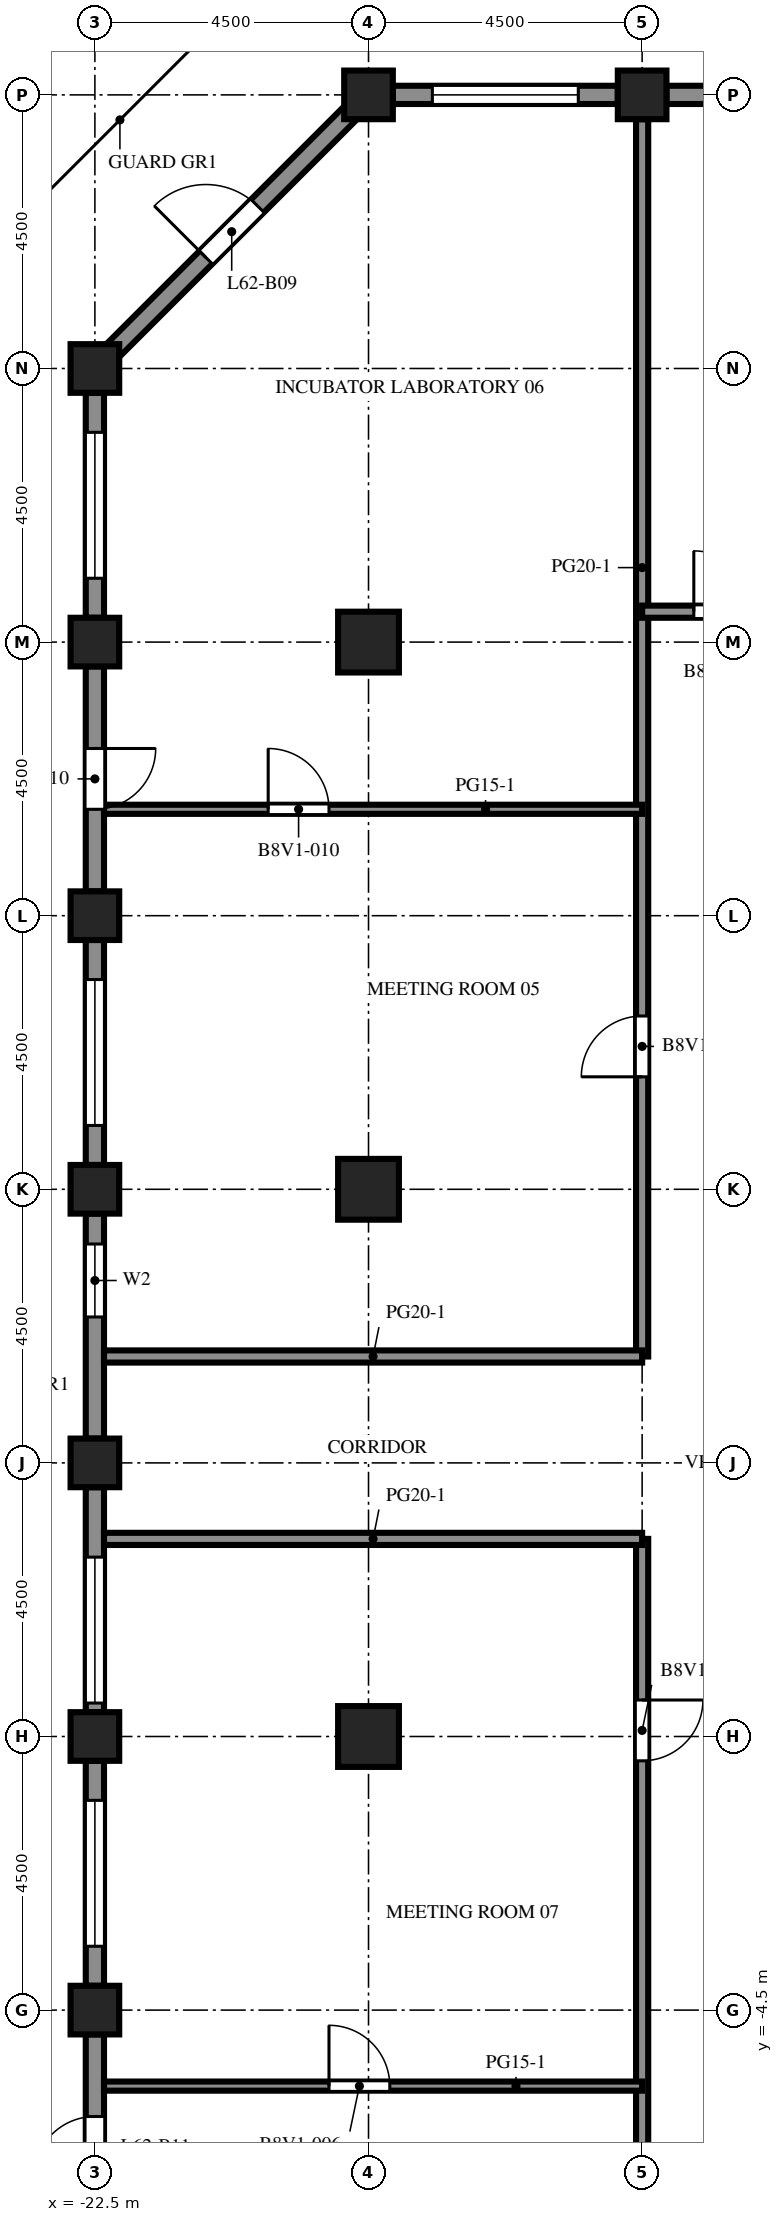
"""IFC4 building model, lengths in metres.
Left out: names, types, materials, properties, quantities, classifications, styles, units other than length and angle.
Written with IfcOpenShell. Run it as: python <this file> out.ifc"""

import sys

from ifc_helpers import new_model, si_unit, direction, frame, frame_2d, origin, origin_2d, place, context, subcontext, project, spatial, rectangle, extrude, element, fill, save


model = new_model("IFC4")
c1 = context("Model", 3, precision=1e-05, world=origin(), true_north=direction((0.0, 1.0)))
c2 = subcontext(c1, "Body", "Model", "MODEL_VIEW")
j1 = project(units=[si_unit("LENGTHUNIT", "METRE"), si_unit("PLANEANGLEUNIT", "RADIAN")], contexts=[c1])
p1 = place(None, origin())
s1 = spatial("IfcSite", under=j1, at=p1, CompositionType="ELEMENT")
p2 = place(p1, origin())
s2 = spatial("IfcBuilding", under=s1, at=p2, CompositionType="ELEMENT")
p3 = place(p2, frame((0.0, 0.0, 274.5)))
s3 = spatial("IfcBuildingStorey", under=s2, at=p3, CompositionType="ELEMENT", Elevation=274.5)
for number, where, z_axis, x_axis in (
    (1, (-22.5, -4.5, 0.0), (0.0, 0.0, 1.0), (1.0, 0.0, 0.0)),
    (2, (-22.5, 0.0, 0.0), (0.0, 0.0, 1.0), (1.0, 0.0, 0.0)),
    (3, (-22.5, 4.5, 0.0), (0.0, 0.0, 1.0), (1.0, 0.0, 0.0)),
    (4, (-22.5, 9.0, 0.0), (0.0, 0.0, 1.0), (1.0, 0.0, 0.0)),
    (5, (-22.5, 13.5, 0.0), (0.0, 0.0, 1.0), (1.0, 0.0, 0.0)),
    (6, (-22.5, 18.0, 0.0), (0.0, 0.0, 1.0), (1.0, 0.0, 0.0)),
    (7, (-22.5, 22.5, 0.0), (0.0, 0.0, 1.0), (1.0, 0.0, 0.0)),
    (8, (-18.0, 27.0, 0.0), (0.0, 0.0, 1.0), (1.0, 0.0, 0.0)),
    (9, (-13.5, 27.0, 0.0), (0.0, 0.0, 1.0), (1.0, 0.0, 0.0)),
):
    element("IfcColumn", number, at=place(p3, frame(where, z_axis=z_axis, x_axis=x_axis)), inside=s3, PredefinedType="COLUMN", context=c2, shape_type="SweptSolid", body=[
        extrude(rectangle(XDim=0.8, YDim=0.8, at=origin_2d()), origin(), (0.0, 0.0, 1.0), 4.1),
    ])
for number, where, z_axis, x_axis in (
    (10, (-18.0, 0.0, 0.0), (0.0, 0.0, 1.0), (1.0, 0.0, 0.0)),
    (11, (-18.0, 9.0, 0.0), (0.0, 0.0, 1.0), (1.0, 0.0, 0.0)),
    (12, (-18.0, 18.0, 0.0), (0.0, 0.0, 1.0), (1.0, 0.0, 0.0)),
):
    element("IfcColumn", number, at=place(p3, frame(where, z_axis=z_axis, x_axis=x_axis)), inside=s3, PredefinedType="COLUMN", context=c2, shape_type="SweptSolid", body=[
        extrude(rectangle(XDim=1.0, YDim=1.0, at=origin_2d()), origin(), (0.0, 0.0, 1.0), 4.1),
    ])
p4 = place(p3, frame((-13.1, 27.0, 0.0), z_axis=(0.0, 0.0, 1.0), x_axis=(1.0, 0.0, 0.0)))
e13 = element("IfcWall", 13, at=p4, inside=s3, PredefinedType="SOLIDWALL", context=c2, shape_type="SweptSolid", body=[
    extrude(rectangle(XDim=3.7, YDim=0.3, at=frame_2d((1.85, 0.0))), origin(), (0.0, 0.0, 1.0), 2.85),
])
p5 = place(p4, frame((1.35, 0.0, 0.0)))
e14 = element("IfcOpeningElement", 14, at=p5, cuts=e13, PredefinedType="OPENING", context=c2, shape_type="SweptSolid", body=[
    extrude(rectangle(XDim=1.0, YDim=2.2, at=frame_2d((0.5, 1.1))), frame((0.0, 0.16, 0.0), z_axis=(0.0, -1.0, 0.0), x_axis=(1.0, 0.0, 0.0)), (0.0, 0.0, 1.0), 0.32),
])
p6 = place(p3, frame((-17.6, 27.0, 0.0), z_axis=(0.0, 0.0, 1.0), x_axis=(1.0, 0.0, 0.0)))
e15 = element("IfcWall", 15, at=p6, inside=s3, PredefinedType="SOLIDWALL", context=c2, shape_type="SweptSolid", body=[
    extrude(rectangle(XDim=3.7, YDim=0.3, at=frame_2d((1.85, 0.0))), origin(), (0.0, 0.0, 1.0), 2.85),
])
p7 = place(p6, frame((0.65, 0.0, 0.8)))
e16 = element("IfcOpeningElement", 16, at=p7, cuts=e15, PredefinedType="OPENING", context=c2, shape_type="SweptSolid", body=[
    extrude(rectangle(XDim=2.4, YDim=1.7, at=frame_2d((1.2, 0.85))), frame((0.0, 0.16, 0.0), z_axis=(0.0, -1.0, 0.0), x_axis=(1.0, 0.0, 0.0)), (0.0, 0.0, 1.0), 0.32),
])
p8 = place(p3, frame((-22.206, 22.794, 0.0), z_axis=(0.0, 0.0, 1.0), x_axis=(0.707106781187, 0.707106781187, 0.0)))
e17 = element("IfcWall", 17, at=p8, inside=s3, PredefinedType="SOLIDWALL", context=c2, shape_type="SweptSolid", body=[
    extrude(rectangle(XDim=5.532, YDim=0.3, at=frame_2d((2.766, 0.0))), origin(), (0.0, 0.0, 1.0), 2.85),
])
p9 = place(p8, frame((2.166, 0.0, 0.0)))
e18 = element("IfcOpeningElement", 18, at=p9, cuts=e17, PredefinedType="OPENING", context=c2, shape_type="SweptSolid", body=[
    extrude(rectangle(XDim=1.2, YDim=2.2, at=frame_2d((0.6, 1.1))), frame((0.0, 0.16, 0.0), z_axis=(0.0, -1.0, 0.0), x_axis=(1.0, 0.0, 0.0)), (0.0, 0.0, 1.0), 0.32),
])
p10 = place(p3, frame((-22.5, 18.4, 0.0), z_axis=(0.0, 0.0, 1.0), x_axis=(0.0, 1.0, 0.0)))
e19 = element("IfcWall", 19, at=p10, inside=s3, PredefinedType="SOLIDWALL", context=c2, shape_type="SweptSolid", body=[
    extrude(rectangle(XDim=3.7, YDim=0.3, at=frame_2d((1.85, 0.0))), origin(), (0.0, 0.0, 1.0), 2.85),
])
p11 = place(p10, frame((0.65, 0.0, 0.8)))
e20 = element("IfcOpeningElement", 20, at=p11, cuts=e19, PredefinedType="OPENING", context=c2, shape_type="SweptSolid", body=[
    extrude(rectangle(XDim=2.4, YDim=1.7, at=frame_2d((1.2, 0.85))), frame((0.0, 0.16, 0.0), z_axis=(0.0, -1.0, 0.0), x_axis=(1.0, 0.0, 0.0)), (0.0, 0.0, 1.0), 0.32),
])
p12 = place(p3, frame((-22.5, 13.9, 0.0), z_axis=(0.0, 0.0, 1.0), x_axis=(0.0, 1.0, 0.0)))
e21 = element("IfcWall", 21, at=p12, inside=s3, PredefinedType="SOLIDWALL", context=c2, shape_type="SweptSolid", body=[
    extrude(rectangle(XDim=3.7, YDim=0.3, at=frame_2d((1.85, 0.0))), origin(), (0.0, 0.0, 1.0), 2.85),
])
p13 = place(p12, frame((1.35, 0.0, 0.0)))
e22 = element("IfcOpeningElement", 22, at=p13, cuts=e21, PredefinedType="OPENING", context=c2, shape_type="SweptSolid", body=[
    extrude(rectangle(XDim=1.0, YDim=2.2, at=frame_2d((0.5, 1.1))), frame((0.0, 0.16, 0.0), z_axis=(0.0, -1.0, 0.0), x_axis=(1.0, 0.0, 0.0)), (0.0, 0.0, 1.0), 0.32),
])
p14 = place(p3, frame((-22.5, 9.4, 0.0), z_axis=(0.0, 0.0, 1.0), x_axis=(0.0, 1.0, 0.0)))
e23 = element("IfcWall", 23, at=p14, inside=s3, PredefinedType="SOLIDWALL", context=c2, shape_type="SweptSolid", body=[
    extrude(rectangle(XDim=3.7, YDim=0.3, at=frame_2d((1.85, 0.0))), origin(), (0.0, 0.0, 1.0), 2.85),
])
p15 = place(p14, frame((0.65, 0.0, 0.8)))
e24 = element("IfcOpeningElement", 24, at=p15, cuts=e23, PredefinedType="OPENING", context=c2, shape_type="SweptSolid", body=[
    extrude(rectangle(XDim=2.4, YDim=1.7, at=frame_2d((1.2, 0.85))), frame((0.0, 0.16, 0.0), z_axis=(0.0, -1.0, 0.0), x_axis=(1.0, 0.0, 0.0)), (0.0, 0.0, 1.0), 0.32),
])
p16 = place(p3, frame((-22.5, 4.9, 0.0), z_axis=(0.0, 0.0, 1.0), x_axis=(0.0, 1.0, 0.0)))
e25 = element("IfcWall", 25, at=p16, inside=s3, PredefinedType="SOLIDWALL", context=c2, shape_type="SweptSolid", body=[
    extrude(rectangle(XDim=3.7, YDim=0.3, at=frame_2d((1.85, 0.0))), origin(), (0.0, 0.0, 1.0), 2.85),
])
p17 = place(p16, frame((2.0, 0.0, 0.8)))
e26 = element("IfcOpeningElement", 26, at=p17, cuts=e25, PredefinedType="OPENING", context=c2, shape_type="SweptSolid", body=[
    extrude(rectangle(XDim=1.2, YDim=1.7, at=frame_2d((0.6, 0.85))), frame((0.0, 0.16, 0.0), z_axis=(0.0, -1.0, 0.0), x_axis=(1.0, 0.0, 0.0)), (0.0, 0.0, 1.0), 0.32),
])
p18 = place(p3, frame((-22.5, 0.4, 0.0), z_axis=(0.0, 0.0, 1.0), x_axis=(0.0, 1.0, 0.0)))
e27 = element("IfcWall", 27, at=p18, inside=s3, PredefinedType="SOLIDWALL", context=c2, shape_type="SweptSolid", body=[
    extrude(rectangle(XDim=3.7, YDim=0.3, at=frame_2d((1.85, 0.0))), origin(), (0.0, 0.0, 1.0), 2.85),
])
p19 = place(p18, frame((0.15, 0.0, 0.8)))
e28 = element("IfcOpeningElement", 28, at=p19, cuts=e27, PredefinedType="OPENING", context=c2, shape_type="SweptSolid", body=[
    extrude(rectangle(XDim=2.4, YDim=1.7, at=frame_2d((1.2, 0.85))), frame((0.0, 0.16, 0.0), z_axis=(0.0, -1.0, 0.0), x_axis=(1.0, 0.0, 0.0)), (0.0, 0.0, 1.0), 0.32),
])
p20 = place(p3, frame((-22.5, -4.1, 0.0), z_axis=(0.0, 0.0, 1.0), x_axis=(0.0, 1.0, 0.0)))
e29 = element("IfcWall", 29, at=p20, inside=s3, PredefinedType="SOLIDWALL", context=c2, shape_type="SweptSolid", body=[
    extrude(rectangle(XDim=3.7, YDim=0.3, at=frame_2d((1.85, 0.0))), origin(), (0.0, 0.0, 1.0), 2.85),
])
p21 = place(p20, frame((0.65, 0.0, 0.8)))
e30 = element("IfcOpeningElement", 30, at=p21, cuts=e29, PredefinedType="OPENING", context=c2, shape_type="SweptSolid", body=[
    extrude(rectangle(XDim=2.4, YDim=1.7, at=frame_2d((1.2, 0.85))), frame((0.0, 0.16, 0.0), z_axis=(0.0, -1.0, 0.0), x_axis=(1.0, 0.0, 0.0)), (0.0, 0.0, 1.0), 0.32),
])
p22 = place(p3, frame((-22.5, -8.6, 0.0), z_axis=(0.0, 0.0, 1.0), x_axis=(0.0, 1.0, 0.0)))
e31 = element("IfcWall", 31, at=p22, inside=s3, PredefinedType="SOLIDWALL", context=c2, shape_type="SweptSolid", body=[
    extrude(rectangle(XDim=3.7, YDim=0.3, at=frame_2d((1.85, 0.0))), origin(), (0.0, 0.0, 1.0), 2.85),
])
p23 = place(p22, frame((1.35, 0.0, 0.0)))
e32 = element("IfcOpeningElement", 32, at=p23, cuts=e31, PredefinedType="OPENING", context=c2, shape_type="SweptSolid", body=[
    extrude(rectangle(XDim=1.0, YDim=2.2, at=frame_2d((0.5, 1.1))), frame((0.0, 0.16, 0.0), z_axis=(0.0, -1.0, 0.0), x_axis=(1.0, 0.0, 0.0)), (0.0, 0.0, 1.0), 0.32),
])
p24 = place(p3, frame((-13.5, -17.6, 0.0), z_axis=(0.0, 0.0, 1.0), x_axis=(0.0, 1.0, 0.0)))
e33 = element("IfcWall", 33, at=p24, inside=s3, PredefinedType="PARTITIONING", context=c2, shape_type="SweptSolid", body=[
    extrude(rectangle(XDim=20.85, YDim=0.2, at=frame_2d((10.425, 0.0))), origin(), (0.0, 0.0, 1.0), 3.65),
])
p25 = place(p24, frame((17.2, 0.0, 0.0)))
e34 = element("IfcOpeningElement", 34, at=p25, cuts=e33, PredefinedType="OPENING", context=c2, shape_type="SweptSolid", body=[
    extrude(rectangle(XDim=1.0, YDim=2.1, at=frame_2d((0.5, 1.05))), frame((0.0, 0.11, 0.0), z_axis=(0.0, -1.0, 0.0), x_axis=(1.0, 0.0, 0.0)), (0.0, 0.0, 1.0), 0.22),
])
p26 = place(p3, frame((-13.5, 6.25, 0.0), z_axis=(0.0, 0.0, 1.0), x_axis=(0.0, 1.0, 0.0)))
e35 = element("IfcWall", 35, at=p26, inside=s3, PredefinedType="PARTITIONING", context=c2, shape_type="SweptSolid", body=[
    extrude(rectangle(XDim=20.35, YDim=0.2, at=frame_2d((10.175, 0.0))), origin(), (0.0, 0.0, 1.0), 3.65),
])
p27 = place(p26, frame((4.6, 0.0, 0.0)))
e36 = element("IfcOpeningElement", 36, at=p27, cuts=e35, PredefinedType="OPENING", context=c2, shape_type="SweptSolid", body=[
    extrude(rectangle(XDim=1.0, YDim=2.1, at=frame_2d((0.5, 1.05))), frame((0.0, 0.11, 0.0), z_axis=(0.0, -1.0, 0.0), x_axis=(1.0, 0.0, 0.0)), (0.0, 0.0, 1.0), 0.22),
])
p28 = place(p3, frame((-13.5, -5.75, 0.0), z_axis=(0.0, 0.0, 1.0), x_axis=(-1.0, 0.0, 0.0)))
e37 = element("IfcWall", 37, at=p28, inside=s3, PredefinedType="PARTITIONING", context=c2, shape_type="SweptSolid", body=[
    extrude(rectangle(XDim=8.85, YDim=0.15, at=frame_2d((4.425, 0.0))), origin(), (0.0, 0.0, 1.0), 3.65),
])
p29 = place(p28, frame((4.15, 0.0, 0.0)))
e38 = element("IfcOpeningElement", 38, at=p29, cuts=e37, PredefinedType="OPENING", context=c2, shape_type="SweptSolid", body=[
    extrude(rectangle(XDim=1.0, YDim=2.1, at=frame_2d((0.5, 1.05))), frame((0.0, 0.085, 0.0), z_axis=(0.0, -1.0, 0.0), x_axis=(1.0, 0.0, 0.0)), (0.0, 0.0, 1.0), 0.17),
])
for number, where, z_axis, x_axis in (
    (39, (-22.35, 3.25, 0.0), (0.0, 0.0, 1.0), (1.0, 0.0, 0.0)),
    (40, (-22.35, 6.25, 0.0), (0.0, 0.0, 1.0), (1.0, 0.0, 0.0)),
):
    element("IfcWall", number, at=place(p3, frame(where, z_axis=z_axis, x_axis=x_axis)), inside=s3, PredefinedType="PARTITIONING", context=c2, shape_type="SweptSolid", body=[
        extrude(rectangle(XDim=8.85, YDim=0.2, at=frame_2d((4.425, 0.0))), origin(), (0.0, 0.0, 1.0), 3.65),
    ])
p30 = place(p3, frame((-22.35, 15.25, 0.0), z_axis=(0.0, 0.0, 1.0), x_axis=(1.0, 0.0, 0.0)))
e41 = element("IfcWall", 41, at=p30, inside=s3, PredefinedType="PARTITIONING", context=c2, shape_type="SweptSolid", body=[
    extrude(rectangle(XDim=8.85, YDim=0.15, at=frame_2d((4.425, 0.0))), origin(), (0.0, 0.0, 1.0), 3.65),
])
p31 = place(p30, frame((2.7, 0.0, 0.0)))
e42 = element("IfcOpeningElement", 42, at=p31, cuts=e41, PredefinedType="OPENING", context=c2, shape_type="SweptSolid", body=[
    extrude(rectangle(XDim=1.0, YDim=2.1, at=frame_2d((0.5, 1.05))), frame((0.0, 0.085, 0.0), z_axis=(0.0, -1.0, 0.0), x_axis=(1.0, 0.0, 0.0)), (0.0, 0.0, 1.0), 0.17),
])
p32 = place(p3, frame((-13.5, 18.5, 0.0), z_axis=(0.0, 0.0, 1.0), x_axis=(1.0, 0.0, 0.0)))
e43 = element("IfcWall", 43, at=p32, inside=s3, PredefinedType="PARTITIONING", context=c2, shape_type="SweptSolid", body=[
    extrude(rectangle(XDim=3.0, YDim=0.2, at=frame_2d((1.5, 0.0))), origin(), (0.0, 0.0, 1.0), 3.65),
])
p33 = place(p32, frame((0.85, 0.0, 0.0)))
e44 = element("IfcOpeningElement", 44, at=p33, cuts=e43, PredefinedType="OPENING", context=c2, shape_type="SweptSolid", body=[
    extrude(rectangle(XDim=1.0, YDim=2.1, at=frame_2d((0.5, 1.05))), frame((0.0, 0.11, 0.0), z_axis=(0.0, -1.0, 0.0), x_axis=(1.0, 0.0, 0.0)), (0.0, 0.0, 1.0), 0.22),
])
p34 = place(p7, origin())
e45 = element("IfcWindow", 45, at=p34, inside=s3, PartitioningType="SINGLE_PANEL", PredefinedType="WINDOW", context=c2, shape_type="SweptSolid", body=[
    extrude(rectangle(XDim=2.4, YDim=1.7, at=frame_2d((1.2, 0.85))), frame((0.0, 0.03, 0.0), z_axis=(0.0, -1.0, 0.0), x_axis=(1.0, 0.0, 0.0)), (0.0, 0.0, 1.0), 0.06),
])
fill(e16, e45)
p35 = place(p9, origin())
e46 = element("IfcDoor", 46, at=p35, inside=s3, OperationType="SINGLE_SWING_LEFT", PredefinedType="DOOR", context=c2, shape_type="SweptSolid", body=[
    extrude(rectangle(XDim=1.2, YDim=2.2, at=frame_2d((0.6, 1.1))), frame((0.0, 0.025, 0.0), z_axis=(0.0, -1.0, 0.0), x_axis=(1.0, 0.0, 0.0)), (0.0, 0.0, 1.0), 0.05),
])
fill(e18, e46)
p36 = place(p11, origin())
e47 = element("IfcWindow", 47, at=p36, inside=s3, PartitioningType="SINGLE_PANEL", PredefinedType="WINDOW", context=c2, shape_type="SweptSolid", body=[
    extrude(rectangle(XDim=2.4, YDim=1.7, at=frame_2d((1.2, 0.85))), frame((0.0, 0.03, 0.0), z_axis=(0.0, -1.0, 0.0), x_axis=(1.0, 0.0, 0.0)), (0.0, 0.0, 1.0), 0.06),
])
fill(e20, e47)
p37 = place(p13, origin())
e48 = element("IfcDoor", 48, at=p37, inside=s3, OperationType="SINGLE_SWING_RIGHT", PredefinedType="DOOR", context=c2, shape_type="SweptSolid", body=[
    extrude(rectangle(XDim=1.0, YDim=2.2, at=frame_2d((0.5, 1.1))), frame((0.0, 0.025, 0.0), z_axis=(0.0, -1.0, 0.0), x_axis=(1.0, 0.0, 0.0)), (0.0, 0.0, 1.0), 0.05),
])
fill(e22, e48)
p38 = place(p15, origin())
e49 = element("IfcWindow", 49, at=p38, inside=s3, PartitioningType="SINGLE_PANEL", PredefinedType="WINDOW", context=c2, shape_type="SweptSolid", body=[
    extrude(rectangle(XDim=2.4, YDim=1.7, at=frame_2d((1.2, 0.85))), frame((0.0, 0.03, 0.0), z_axis=(0.0, -1.0, 0.0), x_axis=(1.0, 0.0, 0.0)), (0.0, 0.0, 1.0), 0.06),
])
fill(e24, e49)
p39 = place(p17, origin())
e50 = element("IfcWindow", 50, at=p39, inside=s3, PartitioningType="SINGLE_PANEL", PredefinedType="WINDOW", context=c2, shape_type="SweptSolid", body=[
    extrude(rectangle(XDim=1.2, YDim=1.7, at=frame_2d((0.6, 0.85))), frame((0.0, 0.03, 0.0), z_axis=(0.0, -1.0, 0.0), x_axis=(1.0, 0.0, 0.0)), (0.0, 0.0, 1.0), 0.06),
])
fill(e26, e50)
p40 = place(p19, origin())
e51 = element("IfcWindow", 51, at=p40, inside=s3, PartitioningType="SINGLE_PANEL", PredefinedType="WINDOW", context=c2, shape_type="SweptSolid", body=[
    extrude(rectangle(XDim=2.4, YDim=1.7, at=frame_2d((1.2, 0.85))), frame((0.0, 0.03, 0.0), z_axis=(0.0, -1.0, 0.0), x_axis=(1.0, 0.0, 0.0)), (0.0, 0.0, 1.0), 0.06),
])
fill(e28, e51)
p41 = place(p21, origin())
e52 = element("IfcWindow", 52, at=p41, inside=s3, PartitioningType="SINGLE_PANEL", PredefinedType="WINDOW", context=c2, shape_type="SweptSolid", body=[
    extrude(rectangle(XDim=2.4, YDim=1.7, at=frame_2d((1.2, 0.85))), frame((0.0, 0.03, 0.0), z_axis=(0.0, -1.0, 0.0), x_axis=(1.0, 0.0, 0.0)), (0.0, 0.0, 1.0), 0.06),
])
fill(e30, e52)
p42 = place(p23, origin())
e53 = element("IfcDoor", 53, at=p42, inside=s3, OperationType="SINGLE_SWING_LEFT", PredefinedType="DOOR", context=c2, shape_type="SweptSolid", body=[
    extrude(rectangle(XDim=1.0, YDim=2.2, at=frame_2d((0.5, 1.1))), frame((0.0, 0.025, 0.0), z_axis=(0.0, -1.0, 0.0), x_axis=(1.0, 0.0, 0.0)), (0.0, 0.0, 1.0), 0.05),
])
fill(e32, e53)
p43 = place(p25, origin())
e54 = element("IfcDoor", 54, at=p43, inside=s3, OperationType="SINGLE_SWING_RIGHT", PredefinedType="DOOR", context=c2, shape_type="SweptSolid", body=[
    extrude(rectangle(XDim=1.0, YDim=2.1, at=frame_2d((0.5, 1.05))), frame((0.0, 0.025, 0.0), z_axis=(0.0, -1.0, 0.0), x_axis=(1.0, 0.0, 0.0)), (0.0, 0.0, 1.0), 0.05),
])
fill(e34, e54)
p44 = place(p27, origin())
e55 = element("IfcDoor", 55, at=p44, inside=s3, OperationType="SINGLE_SWING_LEFT", PredefinedType="DOOR", context=c2, shape_type="SweptSolid", body=[
    extrude(rectangle(XDim=1.0, YDim=2.1, at=frame_2d((0.5, 1.05))), frame((0.0, 0.025, 0.0), z_axis=(0.0, -1.0, 0.0), x_axis=(1.0, 0.0, 0.0)), (0.0, 0.0, 1.0), 0.05),
])
fill(e36, e55)
p45 = place(p29, origin())
e56 = element("IfcDoor", 56, at=p45, inside=s3, OperationType="SINGLE_SWING_RIGHT", PredefinedType="DOOR", context=c2, shape_type="SweptSolid", body=[
    extrude(rectangle(XDim=1.0, YDim=2.1, at=frame_2d((0.5, 1.05))), frame((0.0, 0.025, 0.0), z_axis=(0.0, -1.0, 0.0), x_axis=(1.0, 0.0, 0.0)), (0.0, 0.0, 1.0), 0.05),
])
fill(e38, e56)
p46 = place(p31, origin())
e57 = element("IfcDoor", 57, at=p46, inside=s3, OperationType="SINGLE_SWING_LEFT", PredefinedType="DOOR", context=c2, shape_type="SweptSolid", body=[
    extrude(rectangle(XDim=1.0, YDim=2.1, at=frame_2d((0.5, 1.05))), frame((0.0, 0.025, 0.0), z_axis=(0.0, -1.0, 0.0), x_axis=(1.0, 0.0, 0.0)), (0.0, 0.0, 1.0), 0.05),
])
fill(e42, e57)
p47 = place(p33, origin())
e58 = element("IfcDoor", 58, at=p47, inside=s3, OperationType="SINGLE_SWING_LEFT", PredefinedType="DOOR", context=c2, shape_type="SweptSolid", body=[
    extrude(rectangle(XDim=1.0, YDim=2.1, at=frame_2d((0.5, 1.05))), frame((0.0, 0.025, 0.0), z_axis=(0.0, -1.0, 0.0), x_axis=(1.0, 0.0, 0.0)), (0.0, 0.0, 1.0), 0.05),
])
fill(e44, e58)
save(model, sys.argv[1])
